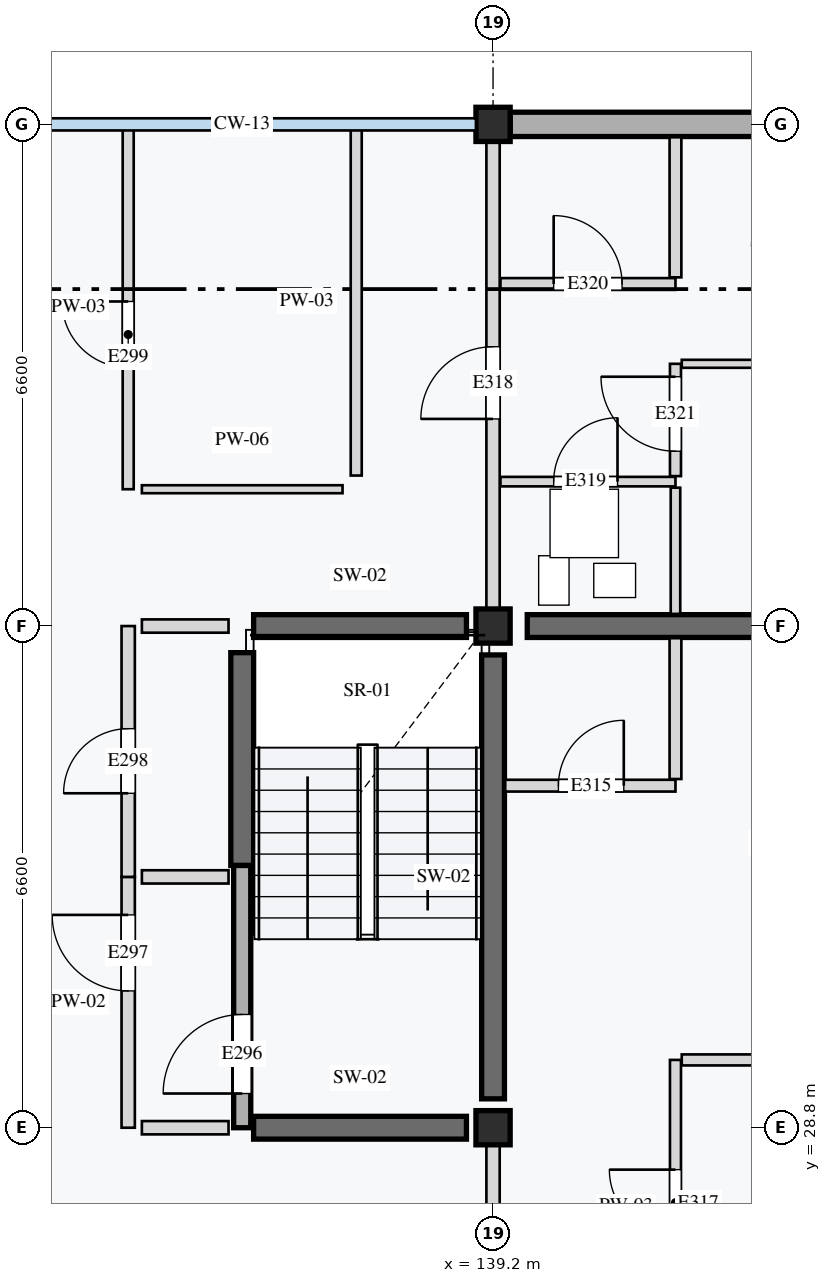
"""IFC4 building model, lengths in metres.
Left out: names, types, materials, properties, quantities, classifications, styles, units other than length and angle.
Written with IfcOpenShell. Run it as: python <this file> out.ifc"""

import sys

from ifc_helpers import new_model, si_unit, direction, frame, frame_2d, origin, origin_2d, place, context, subcontext, project, spatial, rectangle, extrude, element, fill, save


model = new_model("IFC4")
c1 = context("Model", 3, precision=1e-05, world=origin(), true_north=direction((0.0, 1.0)))
c2 = subcontext(c1, "Body", "Model", "MODEL_VIEW")
j1 = project(units=[si_unit("LENGTHUNIT", "METRE"), si_unit("PLANEANGLEUNIT", "RADIAN")], contexts=[c1])
p1 = place(None, origin())
s1 = spatial("IfcSite", under=j1, at=p1, CompositionType="ELEMENT")
p2 = place(p1, origin())
s2 = spatial("IfcBuilding", under=s1, at=p2, CompositionType="ELEMENT")
p3 = place(p2, frame((0.0, 0.0, 24.4)))
s3 = spatial("IfcBuildingStorey", under=s2, at=p3, CompositionType="ELEMENT", Elevation=24.4)
for number, where, z_axis, x_axis in (
    (1, (139.2, 28.8, 0.0), (0.0, 0.0, 1.0), (1.0, 0.0, 0.0)),
    (2, (139.2, 35.4, 0.0), (0.0, 0.0, 1.0), (1.0, 0.0, 0.0)),
    (3, (139.2, 42.0, 0.0), (0.0, 0.0, 1.0), (1.0, 0.0, 0.0)),
):
    element("IfcColumn", number, at=place(p3, frame(where, z_axis=z_axis, x_axis=x_axis)), inside=s3, PredefinedType="COLUMN", context=c2, shape_type="SweptSolid", body=[
        extrude(rectangle(XDim=0.45, YDim=0.45, at=origin_2d()), origin(), (0.0, 0.0, 1.0), 3.2),
    ])
p4 = place(p3, frame((139.2, 29.18, 0.0), z_axis=(0.0, 0.0, 1.0), x_axis=(0.0, 1.0, 0.0)))
e4 = element("IfcWall", 4, at=p4, inside=s3, PredefinedType="SHEAR", context=c2, shape_type="SweptSolid", body=[
    extrude(rectangle(XDim=5.84, YDim=0.3, at=frame_2d((2.92, 0.0))), origin(), (0.0, 0.0, 1.0), 2.97),
])
for number, where, z_axis, x_axis in (
    (5, (135.9, 32.25, 0.0), (0.0, 0.0, 1.0), (0.0, 1.0, 0.0)),
    (6, (136.05, 28.8, 0.0), (0.0, 0.0, 1.0), (1.0, 0.0, 0.0)),
    (7, (136.05, 35.4, 0.0), (0.0, 0.0, 1.0), (1.0, 0.0, 0.0)),
):
    element("IfcWall", number, at=place(p3, frame(where, z_axis=z_axis, x_axis=x_axis)), inside=s3, PredefinedType="SHEAR", context=c2, shape_type="SweptSolid", body=[
        extrude(rectangle(XDim=2.8, YDim=0.3, at=frame_2d((1.4, 0.0))), origin(), (0.0, 0.0, 1.0), 2.97),
    ])
p5 = place(p3, frame((139.65, 35.4, 0.0), z_axis=(0.0, 0.0, 1.0), x_axis=(1.0, 0.0, 0.0)))
e8 = element("IfcWall", 8, at=p5, inside=s3, PredefinedType="SHEAR", context=c2, shape_type="SweptSolid", body=[
    extrude(rectangle(XDim=5.7, YDim=0.3, at=frame_2d((2.85, 0.0))), origin(), (0.0, 0.0, 1.0), 2.97),
])
p6 = place(p3, frame((139.425, 42.0, 0.0), z_axis=(0.0, 0.0, 1.0), x_axis=(1.0, 0.0, 0.0)))
e9 = element("IfcWall", 9, at=p6, inside=s3, PredefinedType="STANDARD", context=c2, shape_type="SweptSolid", body=[
    extrude(rectangle(XDim=4.015, YDim=0.32, at=frame_2d((2.007, 0.0))), origin(), (0.0, 0.0, 1.0), 2.65),
])
p7 = place(p3, frame((135.9, 28.8, 0.0), z_axis=(0.0, 0.0, 1.0), x_axis=(0.0, 1.0, 0.0)))
e10 = element("IfcWall", 10, at=p7, inside=s3, PredefinedType="STANDARD", context=c2, shape_type="SweptSolid", body=[
    extrude(rectangle(XDim=3.45, YDim=0.225, at=frame_2d((1.725, 0.0))), origin(), (0.0, 0.0, 1.0), 2.97),
])
p8 = place(p7, frame((0.45, 0.0, 0.0)))
e11 = element("IfcOpeningElement", 11, at=p8, cuts=e10, PredefinedType="OPENING", context=c2, shape_type="SweptSolid", body=[
    extrude(rectangle(XDim=1.04, YDim=2.12, at=frame_2d((0.52, 1.06))), frame((0.0, 0.123, 0.0), z_axis=(0.0, -1.0, 0.0), x_axis=(1.0, 0.0, 0.0)), (0.0, 0.0, 1.0), 0.245),
])
p9 = place(p3, frame((134.4, 28.8, 0.0), z_axis=(0.0, 0.0, 1.0), x_axis=(0.0, 1.0, 0.0)))
e12 = element("IfcWall", 12, at=p9, inside=s3, PredefinedType="PARTITIONING", context=c2, shape_type="SweptSolid", body=[
    extrude(rectangle(XDim=3.3, YDim=0.175, at=frame_2d((1.65, 0.0))), origin(), (0.0, 0.0, 1.0), 2.97),
])
p10 = place(p9, frame((1.8, 0.0, 0.0)))
e13 = element("IfcOpeningElement", 13, at=p10, cuts=e12, PredefinedType="OPENING", context=c2, shape_type="SweptSolid", body=[
    extrude(rectangle(XDim=1.0, YDim=2.1, at=frame_2d((0.5, 1.05))), frame((0.0, 0.097, 0.0), z_axis=(0.0, -1.0, 0.0), x_axis=(1.0, 0.0, 0.0)), (0.0, 0.0, 1.0), 0.195),
])
p11 = place(p3, frame((134.4, 32.1, 0.0), z_axis=(0.0, 0.0, 1.0), x_axis=(0.0, 1.0, 0.0)))
e14 = element("IfcWall", 14, at=p11, inside=s3, PredefinedType="PARTITIONING", context=c2, shape_type="SweptSolid", body=[
    extrude(rectangle(XDim=3.3, YDim=0.175, at=frame_2d((1.65, 0.0))), origin(), (0.0, 0.0, 1.0), 2.97),
])
p12 = place(p11, frame((1.1, 0.0, 0.0)))
e15 = element("IfcOpeningElement", 15, at=p12, cuts=e14, PredefinedType="OPENING", context=c2, shape_type="SweptSolid", body=[
    extrude(rectangle(XDim=0.85, YDim=2.0, at=frame_2d((0.425, 1.0))), frame((0.0, 0.097, 0.0), z_axis=(0.0, -1.0, 0.0), x_axis=(1.0, 0.0, 0.0)), (0.0, 0.0, 1.0), 0.195),
])
for number, where, z_axis, x_axis in (
    (16, (134.58, 28.8, 0.0), (0.0, 0.0, 1.0), (1.0, 0.0, 0.0)),
    (17, (134.58, 32.1, 0.0), (0.0, 0.0, 1.0), (1.0, 0.0, 0.0)),
    (18, (134.58, 35.4, 0.0), (0.0, 0.0, 1.0), (1.0, 0.0, 0.0)),
):
    element("IfcWall", number, at=place(p3, frame(where, z_axis=z_axis, x_axis=x_axis)), inside=s3, PredefinedType="PARTITIONING", context=c2, shape_type="SweptSolid", body=[
        extrude(rectangle(XDim=1.14, YDim=0.175, at=frame_2d((0.57, 0.0))), origin(), (0.0, 0.0, 1.0), 2.97),
    ])
p13 = place(p3, frame((134.4, 37.2, 0.0), z_axis=(0.0, 0.0, 1.0), x_axis=(0.0, 1.0, 0.0)))
e19 = element("IfcWall", 19, at=p13, inside=s3, PredefinedType="PARTITIONING", context=c2, shape_type="SweptSolid", body=[
    extrude(rectangle(XDim=4.8, YDim=0.145, at=frame_2d((2.4, 0.0))), origin(), (0.0, 0.0, 1.0), 2.97),
])
p14 = place(p13, frame((1.6, 0.0, 0.0)))
e20 = element("IfcOpeningElement", 20, at=p14, cuts=e19, PredefinedType="OPENING", context=c2, shape_type="SweptSolid", body=[
    extrude(rectangle(XDim=0.87, YDim=2.08, at=frame_2d((0.435, 1.04))), frame((0.0, 0.083, 0.0), z_axis=(0.0, -1.0, 0.0), x_axis=(1.0, 0.0, 0.0)), (0.0, 0.0, 1.0), 0.165),
])
p15 = place(p3, frame((137.4, 37.38, 0.0), z_axis=(0.0, 0.0, 1.0), x_axis=(0.0, 1.0, 0.0)))
e21 = element("IfcWall", 21, at=p15, inside=s3, PredefinedType="PARTITIONING", context=c2, shape_type="SweptSolid", body=[
    extrude(rectangle(XDim=4.6, YDim=0.145, at=frame_2d((2.3, 0.0))), origin(), (0.0, 0.0, 1.0), 2.97),
])
p16 = place(p3, frame((134.58, 37.2, 0.0), z_axis=(0.0, 0.0, 1.0), x_axis=(1.0, 0.0, 0.0)))
e22 = element("IfcWall", 22, at=p16, inside=s3, PredefinedType="PARTITIONING", context=c2, shape_type="SweptSolid", body=[
    extrude(rectangle(XDim=2.64, YDim=0.105, at=frame_2d((1.32, 0.0))), origin(), (0.0, 0.0, 1.0), 2.97),
])
p17 = place(p3, frame((139.2, 22.2, 0.0), z_axis=(0.0, 0.0, 1.0), x_axis=(0.0, 1.0, 0.0)))
e23 = element("IfcWall", 23, at=p17, inside=s3, PredefinedType="PARTITIONING", context=c2, shape_type="SweptSolid", body=[
    extrude(rectangle(XDim=6.6, YDim=0.175, at=frame_2d((3.3, 0.0))), origin(), (0.0, 0.0, 1.0), 2.7),
])
p18 = place(p17, frame((3.85, 0.0, 0.0)))
e24 = element("IfcOpeningElement", 24, at=p18, cuts=e23, PredefinedType="OPENING", context=c2, shape_type="SweptSolid", body=[
    extrude(rectangle(XDim=0.95, YDim=2.1, at=frame_2d((0.475, 1.05))), frame((0.0, 0.097, 0.0), z_axis=(0.0, -1.0, 0.0), x_axis=(1.0, 0.0, 0.0)), (0.0, 0.0, 1.0), 0.195),
])
p19 = place(p3, frame((139.36, 33.3, 0.0), z_axis=(0.0, 0.0, 1.0), x_axis=(1.0, 0.0, 0.0)))
e25 = element("IfcWall", 25, at=p19, inside=s3, PredefinedType="PARTITIONING", context=c2, shape_type="SweptSolid", body=[
    extrude(rectangle(XDim=2.24, YDim=0.155, at=frame_2d((1.12, 0.0))), origin(), (0.0, 0.0, 1.0), 2.97),
])
p20 = place(p19, frame((0.7, 0.0, 0.0)))
e26 = element("IfcOpeningElement", 26, at=p20, cuts=e25, PredefinedType="OPENING", context=c2, shape_type="SweptSolid", body=[
    extrude(rectangle(XDim=0.86, YDim=2.12, at=frame_2d((0.43, 1.06))), frame((0.0, 0.087, 0.0), z_axis=(0.0, -1.0, 0.0), x_axis=(1.0, 0.0, 0.0)), (0.0, 0.0, 1.0), 0.175),
])
p21 = place(p3, frame((141.6, 33.387, 0.0), z_axis=(0.0, 0.0, 1.0), x_axis=(0.0, 1.0, 0.0)))
e27 = element("IfcWall", 27, at=p21, inside=s3, PredefinedType="PARTITIONING", context=c2, shape_type="SweptSolid", body=[
    extrude(rectangle(XDim=1.853, YDim=0.155, at=frame_2d((0.926, 0.0))), origin(), (0.0, 0.0, 1.0), 2.97),
])
p22 = place(p3, frame((141.6, 25.833, 0.0), z_axis=(0.0, 0.0, 1.0), x_axis=(0.0, 1.0, 0.0)))
e28 = element("IfcWall", 28, at=p22, inside=s3, PredefinedType="PARTITIONING", context=c2, shape_type="SweptSolid", body=[
    extrude(rectangle(XDim=3.859, YDim=0.145, at=frame_2d((1.93, 0.0))), origin(), (0.0, 0.0, 1.0), 2.97),
])
p23 = place(p22, frame((1.546, 0.0, 0.0)))
e29 = element("IfcOpeningElement", 29, at=p23, cuts=e28, PredefinedType="OPENING", context=c2, shape_type="SweptSolid", body=[
    extrude(rectangle(XDim=0.87, YDim=2.08, at=frame_2d((0.435, 1.04))), frame((0.0, 0.083, 0.0), z_axis=(0.0, -1.0, 0.0), x_axis=(1.0, 0.0, 0.0)), (0.0, 0.0, 1.0), 0.165),
])
p24 = place(p3, frame((141.683, 29.692, 0.0), z_axis=(0.0, 0.0, 1.0), x_axis=(1.0, 0.0, 0.0)))
e30 = element("IfcWall", 30, at=p24, inside=s3, PredefinedType="PARTITIONING", context=c2, shape_type="SweptSolid", body=[
    extrude(rectangle(XDim=3.947, YDim=0.145, at=frame_2d((1.974, 0.0))), origin(), (0.0, 0.0, 1.0), 2.97),
])
p25 = place(p3, frame((139.2, 35.4, 0.0), z_axis=(0.0, 0.0, 1.0), x_axis=(0.0, 1.0, 0.0)))
e31 = element("IfcWall", 31, at=p25, inside=s3, PredefinedType="PARTITIONING", context=c2, shape_type="SweptSolid", body=[
    extrude(rectangle(XDim=6.6, YDim=0.175, at=frame_2d((3.3, 0.0))), origin(), (0.0, 0.0, 1.0), 2.7),
])
p26 = place(p25, frame((2.725, 0.0, 0.0)))
e32 = element("IfcOpeningElement", 32, at=p26, cuts=e31, PredefinedType="OPENING", context=c2, shape_type="SweptSolid", body=[
    extrude(rectangle(XDim=0.95, YDim=2.16, at=frame_2d((0.475, 1.08))), frame((0.0, 0.097, 0.0), z_axis=(0.0, -1.0, 0.0), x_axis=(1.0, 0.0, 0.0)), (0.0, 0.0, 1.0), 0.195),
])
p27 = place(p3, frame((139.298, 37.3, 0.0), z_axis=(0.0, 0.0, 1.0), x_axis=(1.0, 0.0, 0.0)))
e33 = element("IfcWall", 33, at=p27, inside=s3, PredefinedType="PARTITIONING", context=c2, shape_type="SweptSolid", body=[
    extrude(rectangle(XDim=2.302, YDim=0.125, at=frame_2d((1.151, 0.0))), origin(), (0.0, 0.0, 1.0), 2.97),
])
p28 = place(p27, frame((0.7, 0.0, 0.0)))
e34 = element("IfcOpeningElement", 34, at=p28, cuts=e33, PredefinedType="OPENING", context=c2, shape_type="SweptSolid", body=[
    extrude(rectangle(XDim=0.84, YDim=2.06, at=frame_2d((0.42, 1.03))), frame((0.0, 0.073, 0.0), z_axis=(0.0, -1.0, 0.0), x_axis=(1.0, 0.0, 0.0)), (0.0, 0.0, 1.0), 0.145),
])
p29 = place(p3, frame((141.6, 35.56, 0.0), z_axis=(0.0, 0.0, 1.0), x_axis=(0.0, 1.0, 0.0)))
e35 = element("IfcWall", 35, at=p29, inside=s3, PredefinedType="PARTITIONING", context=c2, shape_type="SweptSolid", body=[
    extrude(rectangle(XDim=1.66, YDim=0.125, at=frame_2d((0.83, 0.0))), origin(), (0.0, 0.0, 1.0), 2.97),
])
p30 = place(p3, frame((139.298, 39.9, 0.0), z_axis=(0.0, 0.0, 1.0), x_axis=(1.0, 0.0, 0.0)))
e36 = element("IfcWall", 36, at=p30, inside=s3, PredefinedType="PARTITIONING", context=c2, shape_type="SweptSolid", body=[
    extrude(rectangle(XDim=2.302, YDim=0.155, at=frame_2d((1.151, 0.0))), origin(), (0.0, 0.0, 1.0), 2.97),
])
p31 = place(p30, frame((0.7, 0.0, 0.0)))
e37 = element("IfcOpeningElement", 37, at=p31, cuts=e36, PredefinedType="OPENING", context=c2, shape_type="SweptSolid", body=[
    extrude(rectangle(XDim=0.9, YDim=2.16, at=frame_2d((0.45, 1.08))), frame((0.0, 0.087, 0.0), z_axis=(0.0, -1.0, 0.0), x_axis=(1.0, 0.0, 0.0)), (0.0, 0.0, 1.0), 0.175),
])
p32 = place(p3, frame((141.6, 39.988, 0.0), z_axis=(0.0, 0.0, 1.0), x_axis=(0.0, 1.0, 0.0)))
e38 = element("IfcWall", 38, at=p32, inside=s3, PredefinedType="PARTITIONING", context=c2, shape_type="SweptSolid", body=[
    extrude(rectangle(XDim=1.843, YDim=0.155, at=frame_2d((0.921, 0.0))), origin(), (0.0, 0.0, 1.0), 2.97),
])
p33 = place(p3, frame((141.6, 37.373, 0.0), z_axis=(0.0, 0.0, 1.0), x_axis=(0.0, 1.0, 0.0)))
e39 = element("IfcWall", 39, at=p33, inside=s3, PredefinedType="PARTITIONING", context=c2, shape_type="SweptSolid", body=[
    extrude(rectangle(XDim=1.478, YDim=0.145, at=frame_2d((0.739, 0.0))), origin(), (0.0, 0.0, 1.0), 2.97),
])
p34 = place(p33, frame((0.327, 0.0, 0.0)))
e40 = element("IfcOpeningElement", 40, at=p34, cuts=e39, PredefinedType="OPENING", context=c2, shape_type="SweptSolid", body=[
    extrude(rectangle(XDim=0.98, YDim=2.12, at=frame_2d((0.49, 1.06))), frame((0.0, 0.083, 0.0), z_axis=(0.0, -1.0, 0.0), x_axis=(1.0, 0.0, 0.0)), (0.0, 0.0, 1.0), 0.165),
])
p35 = place(p3, frame((141.683, 38.85, 0.0), z_axis=(0.0, 0.0, 1.0), x_axis=(1.0, 0.0, 0.0)))
e41 = element("IfcWall", 41, at=p35, inside=s3, PredefinedType="PARTITIONING", context=c2, shape_type="SweptSolid", body=[
    extrude(rectangle(XDim=3.947, YDim=0.105, at=frame_2d((1.974, 0.0))), origin(), (0.0, 0.0, 1.0), 2.97),
])
p36 = place(p8, origin())
e42 = element("IfcDoor", 42, at=p36, inside=s3, OperationType="SINGLE_SWING_LEFT", PredefinedType="DOOR", context=c2, shape_type="SweptSolid", body=[
    extrude(rectangle(XDim=1.04, YDim=2.12, at=frame_2d((0.52, 1.06))), frame((0.0, 0.025, 0.0), z_axis=(0.0, -1.0, 0.0), x_axis=(1.0, 0.0, 0.0)), (0.0, 0.0, 1.0), 0.05),
])
fill(e11, e42)
p37 = place(p10, origin())
e43 = element("IfcDoor", 43, at=p37, inside=s3, OperationType="SINGLE_SWING_RIGHT", PredefinedType="DOOR", context=c2, shape_type="SweptSolid", body=[
    extrude(rectangle(XDim=1.0, YDim=2.1, at=frame_2d((0.5, 1.05))), frame((0.0, 0.025, 0.0), z_axis=(0.0, -1.0, 0.0), x_axis=(1.0, 0.0, 0.0)), (0.0, 0.0, 1.0), 0.05),
])
fill(e13, e43)
p38 = place(p12, origin())
e44 = element("IfcDoor", 44, at=p38, inside=s3, OperationType="SINGLE_SWING_LEFT", PredefinedType="DOOR", context=c2, shape_type="SweptSolid", body=[
    extrude(rectangle(XDim=0.85, YDim=2.0, at=frame_2d((0.425, 1.0))), frame((0.0, 0.025, 0.0), z_axis=(0.0, -1.0, 0.0), x_axis=(1.0, 0.0, 0.0)), (0.0, 0.0, 1.0), 0.05),
])
fill(e15, e44)
p39 = place(p14, origin())
e45 = element("IfcDoor", 45, at=p39, inside=s3, OperationType="SINGLE_SWING_RIGHT", PredefinedType="DOOR", context=c2, shape_type="SweptSolid", body=[
    extrude(rectangle(XDim=0.87, YDim=2.08, at=frame_2d((0.435, 1.04))), frame((0.0, 0.025, 0.0), z_axis=(0.0, -1.0, 0.0), x_axis=(1.0, 0.0, 0.0)), (0.0, 0.0, 1.0), 0.05),
])
fill(e20, e45)
p40 = place(p20, origin())
e46 = element("IfcDoor", 46, at=p40, inside=s3, OperationType="SINGLE_SWING_RIGHT", PredefinedType="DOOR", context=c2, shape_type="SweptSolid", body=[
    extrude(rectangle(XDim=0.86, YDim=2.12, at=frame_2d((0.43, 1.06))), frame((0.0, 0.025, 0.0), z_axis=(0.0, -1.0, 0.0), x_axis=(1.0, 0.0, 0.0)), (0.0, 0.0, 1.0), 0.05),
])
fill(e26, e46)
p41 = place(p23, origin())
e47 = element("IfcDoor", 47, at=p41, inside=s3, OperationType="SINGLE_SWING_RIGHT", PredefinedType="DOOR", context=c2, shape_type="SweptSolid", body=[
    extrude(rectangle(XDim=0.87, YDim=2.08, at=frame_2d((0.435, 1.04))), frame((0.0, 0.025, 0.0), z_axis=(0.0, -1.0, 0.0), x_axis=(1.0, 0.0, 0.0)), (0.0, 0.0, 1.0), 0.05),
])
fill(e29, e47)
p42 = place(p26, origin())
e48 = element("IfcDoor", 48, at=p42, inside=s3, OperationType="SINGLE_SWING_LEFT", PredefinedType="DOOR", context=c2, shape_type="SweptSolid", body=[
    extrude(rectangle(XDim=0.95, YDim=2.16, at=frame_2d((0.475, 1.08))), frame((0.0, 0.025, 0.0), z_axis=(0.0, -1.0, 0.0), x_axis=(1.0, 0.0, 0.0)), (0.0, 0.0, 1.0), 0.05),
])
fill(e32, e48)
p43 = place(p28, origin())
e49 = element("IfcDoor", 49, at=p43, inside=s3, OperationType="SINGLE_SWING_RIGHT", PredefinedType="DOOR", context=c2, shape_type="SweptSolid", body=[
    extrude(rectangle(XDim=0.84, YDim=2.06, at=frame_2d((0.42, 1.03))), frame((0.0, 0.025, 0.0), z_axis=(0.0, -1.0, 0.0), x_axis=(1.0, 0.0, 0.0)), (0.0, 0.0, 1.0), 0.05),
])
fill(e34, e49)
p44 = place(p31, origin())
e50 = element("IfcDoor", 50, at=p44, inside=s3, OperationType="SINGLE_SWING_LEFT", PredefinedType="DOOR", context=c2, shape_type="SweptSolid", body=[
    extrude(rectangle(XDim=0.9, YDim=2.16, at=frame_2d((0.45, 1.08))), frame((0.0, 0.025, 0.0), z_axis=(0.0, -1.0, 0.0), x_axis=(1.0, 0.0, 0.0)), (0.0, 0.0, 1.0), 0.05),
])
fill(e37, e50)
p45 = place(p34, origin())
e51 = element("IfcDoor", 51, at=p45, inside=s3, OperationType="SINGLE_SWING_RIGHT", PredefinedType="DOOR", context=c2, shape_type="SweptSolid", body=[
    extrude(rectangle(XDim=0.98, YDim=2.12, at=frame_2d((0.49, 1.06))), frame((0.0, 0.025, 0.0), z_axis=(0.0, -1.0, 0.0), x_axis=(1.0, 0.0, 0.0)), (0.0, 0.0, 1.0), 0.05),
])
fill(e40, e51)
save(model, sys.argv[1])
